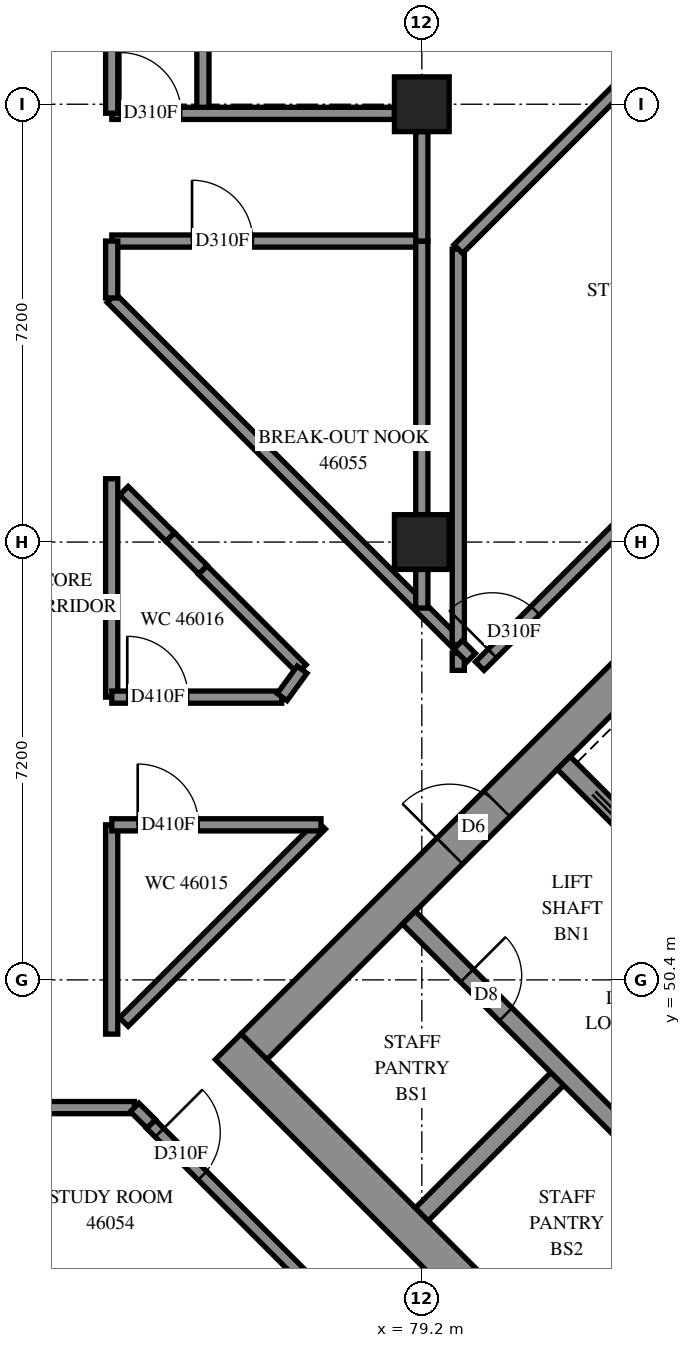
"""IFC4 building model, lengths in metres.
Left out: names, types, materials, properties, quantities, classifications, styles, units other than length and angle.
Written with IfcOpenShell. Run it as: python <this file> out.ifc"""

import sys

from ifc_helpers import new_model, si_unit, direction, frame, frame_2d, origin, origin_2d, place, context, subcontext, project, spatial, rectangle, extrude, element, fill, save


model = new_model("IFC4")
c1 = context("Model", 3, precision=1e-05, world=origin(), true_north=direction((0.0, 1.0)))
c2 = subcontext(c1, "Body", "Model", "MODEL_VIEW")
j1 = project(units=[si_unit("LENGTHUNIT", "METRE"), si_unit("PLANEANGLEUNIT", "RADIAN")], contexts=[c1])
p1 = place(None, origin())
s1 = spatial("IfcSite", under=j1, at=p1, CompositionType="ELEMENT")
p2 = place(p1, origin())
s2 = spatial("IfcBuilding", under=s1, at=p2, CompositionType="ELEMENT")
p3 = place(p2, frame((0.0, 0.0, 169.4)))
s3 = spatial("IfcBuildingStorey", under=s2, at=p3, CompositionType="ELEMENT", Elevation=169.4)
for number, where, z_axis, x_axis in (
    (1, (79.2, 57.6, 0.0), (0.0, 0.0, 1.0), (1.0, 0.0, 0.0)),
    (2, (79.2, 64.8, 0.0), (0.0, 0.0, 1.0), (1.0, 0.0, 0.0)),
):
    element("IfcColumn", number, at=place(p3, frame(where, z_axis=z_axis, x_axis=x_axis)), inside=s3, PredefinedType="COLUMN", context=c2, shape_type="SweptSolid", body=[
        extrude(rectangle(XDim=0.9, YDim=0.9, at=origin_2d()), origin(), (0.0, 0.0, 1.0), 3.1),
    ])
p4 = place(p3, frame((76.018, 49.302, -0.3), z_axis=(0.0, 0.0, 1.0), x_axis=(0.7071067812, -0.7071067812, 0.0)))
e3 = element("IfcWall", 3, at=p4, inside=s3, PredefinedType="SHEAR", context=c2, shape_type="SweptSolid", body=[
    extrude(rectangle(XDim=15.6, YDim=0.6, at=frame_2d((7.8, 0.0))), origin(), (0.0, 0.0, 1.0), 2.7),
])
p5 = place(p3, frame((76.442, 49.302, -0.3), z_axis=(0.0, 0.0, 1.0), x_axis=(0.7071067812, 0.7071067812, 0.0)))
e4 = element("IfcWall", 4, at=p5, inside=s3, PredefinedType="SHEAR", context=c2, shape_type="SweptSolid", body=[
    extrude(rectangle(XDim=14.4, YDim=0.6, at=frame_2d((7.2, 0.0))), origin(), (0.0, 0.0, 1.0), 2.7),
])
p6 = place(p5, frame((4.55, 0.0, 0.3)))
e5 = element("IfcOpeningElement", 5, at=p6, cuts=e4, PredefinedType="OPENING", context=c2, shape_type="SweptSolid", body=[
    extrude(rectangle(XDim=1.1, YDim=2.1, at=frame_2d((0.55, 1.05))), frame((0.0, 0.31, 0.0), z_axis=(0.0, -1.0, 0.0), x_axis=(1.0, 0.0, 0.0)), (0.0, 0.0, 1.0), 0.62),
])
p7 = place(p5, frame((11.35, 0.0, 0.3)))
e6 = element("IfcOpeningElement", 6, at=p7, cuts=e4, PredefinedType="OPENING", context=c2, shape_type="SweptSolid", body=[
    extrude(rectangle(XDim=1.1, YDim=2.1, at=frame_2d((0.55, 1.05))), frame((0.0, 0.31, 0.0), z_axis=(0.0, -1.0, 0.0), x_axis=(1.0, 0.0, 0.0)), (0.0, 0.0, 1.0), 0.62),
])
p8 = place(p3, frame((79.2, 46.544, 0.0), z_axis=(0.0, 0.0, 1.0), x_axis=(0.7071219326, 0.7070916295, 0.0)))
e7 = element("IfcWall", 7, at=p8, inside=s3, PredefinedType="SOLIDWALL", context=c2, shape_type="SweptSolid", body=[
    extrude(rectangle(XDim=3.3, YDim=0.3, at=frame_2d((1.65, 0.0))), origin(), (0.0, 0.0, 1.0), 3.1),
])
p9 = place(p3, frame((81.746, 43.999, 0.0), z_axis=(0.0, 0.0, 1.0), x_axis=(0.7071067812, 0.7071067812, 0.0)))
e8 = element("IfcWall", 8, at=p9, inside=s3, PredefinedType="SOLIDWALL", context=c2, shape_type="SweptSolid", body=[
    extrude(rectangle(XDim=3.3, YDim=0.3, at=frame_2d((1.65, 0.0))), origin(), (0.0, 0.0, 1.0), 3.1),
])
p10 = place(p3, frame((78.988, 51.423, 0.0), z_axis=(0.0, 0.0, 1.0), x_axis=(0.7071067812, -0.7071067812, 0.0)))
e9 = element("IfcWall", 9, at=p10, inside=s3, PredefinedType="SOLIDWALL", context=c2, shape_type="SweptSolid", body=[
    extrude(rectangle(XDim=14.4, YDim=0.3, at=frame_2d((7.2, 0.0))), origin(), (0.0, 0.0, 1.0), 3.1),
])
p11 = place(p10, frame((1.35, 0.0, 0.0)))
e10 = element("IfcOpeningElement", 10, at=p11, cuts=e9, PredefinedType="OPENING", context=c2, shape_type="SweptSolid", body=[
    extrude(rectangle(XDim=0.9, YDim=2.1, at=frame_2d((0.45, 1.05))), frame((0.0, 0.16, 0.0), z_axis=(0.0, -1.0, 0.0), x_axis=(1.0, 0.0, 0.0)), (0.0, 0.0, 1.0), 0.32),
])
p12 = place(p10, frame((4.95, 0.0, 0.0)))
e11 = element("IfcOpeningElement", 11, at=p12, cuts=e9, PredefinedType="OPENING", context=c2, shape_type="SweptSolid", body=[
    extrude(rectangle(XDim=0.9, YDim=2.1, at=frame_2d((0.45, 1.05))), frame((0.0, 0.16, 0.0), z_axis=(0.0, -1.0, 0.0), x_axis=(1.0, 0.0, 0.0)), (0.0, 0.0, 1.0), 0.32),
])
p13 = place(p10, frame((8.55, 0.0, 0.0)))
e12 = element("IfcOpeningElement", 12, at=p13, cuts=e9, PredefinedType="OPENING", context=c2, shape_type="SweptSolid", body=[
    extrude(rectangle(XDim=0.9, YDim=2.1, at=frame_2d((0.45, 1.05))), frame((0.0, 0.16, 0.0), z_axis=(0.0, -1.0, 0.0), x_axis=(1.0, 0.0, 0.0)), (0.0, 0.0, 1.0), 0.32),
])
p14 = place(p10, frame((12.05, 0.0, 0.0)))
e13 = element("IfcOpeningElement", 13, at=p14, cuts=e9, PredefinedType="OPENING", context=c2, shape_type="SweptSolid", body=[
    extrude(rectangle(XDim=1.1, YDim=2.1, at=frame_2d((0.55, 1.05))), frame((0.0, 0.16, 0.0), z_axis=(0.0, -1.0, 0.0), x_axis=(1.0, 0.0, 0.0)), (0.0, 0.0, 1.0), 0.32),
])
p15 = place(p3, frame((81.534, 53.969, 0.0), z_axis=(0.0, 0.0, 1.0), x_axis=(0.707103309, -0.7071102534, 0.0)))
e14 = element("IfcWall", 14, at=p15, inside=s3, PredefinedType="SOLIDWALL", context=c2, shape_type="SweptSolid", body=[
    extrude(rectangle(XDim=14.4, YDim=0.3, at=frame_2d((7.2, 0.0))), origin(), (0.0, 0.0, 1.0), 3.1),
])
p16 = place(p15, frame((1.25, 0.0, 0.0)))
e15 = element("IfcOpeningElement", 15, at=p16, cuts=e14, PredefinedType="OPENING", context=c2, shape_type="SweptSolid", body=[
    extrude(rectangle(XDim=1.1, YDim=2.1, at=frame_2d((0.55, 1.05))), frame((0.0, 0.16, 0.0), z_axis=(0.0, -1.0, 0.0), x_axis=(1.0, 0.0, 0.0)), (0.0, 0.0, 1.0), 0.32),
])
p17 = place(p15, frame((4.85, 0.0, 0.0)))
e16 = element("IfcOpeningElement", 16, at=p17, cuts=e14, PredefinedType="OPENING", context=c2, shape_type="SweptSolid", body=[
    extrude(rectangle(XDim=1.1, YDim=2.1, at=frame_2d((0.55, 1.05))), frame((0.0, 0.16, 0.0), z_axis=(0.0, -1.0, 0.0), x_axis=(1.0, 0.0, 0.0)), (0.0, 0.0, 1.0), 0.32),
])
p18 = place(p15, frame((8.45, 0.0, 0.0)))
e17 = element("IfcOpeningElement", 17, at=p18, cuts=e14, PredefinedType="OPENING", context=c2, shape_type="SweptSolid", body=[
    extrude(rectangle(XDim=1.1, YDim=2.1, at=frame_2d((0.55, 1.05))), frame((0.0, 0.16, 0.0), z_axis=(0.0, -1.0, 0.0), x_axis=(1.0, 0.0, 0.0)), (0.0, 0.0, 1.0), 0.32),
])
p19 = place(p15, frame((12.05, 0.0, 0.0)))
e18 = element("IfcOpeningElement", 18, at=p19, cuts=e14, PredefinedType="OPENING", context=c2, shape_type="SweptSolid", body=[
    extrude(rectangle(XDim=1.1, YDim=2.1, at=frame_2d((0.55, 1.05))), frame((0.0, 0.16, 0.0), z_axis=(0.0, -1.0, 0.0), x_axis=(1.0, 0.0, 0.0)), (0.0, 0.0, 1.0), 0.32),
])
p20 = place(p3, frame((55.5, 48.3, 0.0), z_axis=(0.0, 0.0, 1.0), x_axis=(1.0, 0.0, 0.0)))
e19 = element("IfcWall", 19, at=p20, inside=s3, PredefinedType="PARTITIONING", context=c2, shape_type="SweptSolid", body=[
    extrude(rectangle(XDim=18.974, YDim=0.2, at=frame_2d((9.487, 0.0))), origin(), (0.0, 0.0, 1.0), 3.1),
])
p21 = place(p20, frame((5.963, 0.0, 0.0)))
e20 = element("IfcOpeningElement", 20, at=p21, cuts=e19, PredefinedType="OPENING", context=c2, shape_type="SweptSolid", body=[
    extrude(rectangle(XDim=1.0, YDim=2.1, at=frame_2d((0.5, 1.05))), frame((0.0, 0.11, 0.0), z_axis=(0.0, -1.0, 0.0), x_axis=(1.0, 0.0, 0.0)), (0.0, 0.0, 1.0), 0.22),
])
p22 = place(p20, frame((13.161, 0.0, 0.0)))
e21 = element("IfcOpeningElement", 21, at=p22, cuts=e19, PredefinedType="OPENING", context=c2, shape_type="SweptSolid", body=[
    extrude(rectangle(XDim=0.9, YDim=2.1, at=frame_2d((0.45, 1.05))), frame((0.0, 0.11, 0.0), z_axis=(0.0, -1.0, 0.0), x_axis=(1.0, 0.0, 0.0)), (0.0, 0.0, 1.0), 0.22),
])
p23 = place(p3, frame((80.154, 55.56, 0.0), z_axis=(0.0, 0.0, 1.0), x_axis=(0.7071067812, 0.7071067812, 0.0)))
e22 = element("IfcWall", 22, at=p23, inside=s3, PredefinedType="PARTITIONING", context=c2, shape_type="SweptSolid", body=[
    extrude(rectangle(XDim=9.45, YDim=0.2, at=frame_2d((4.725, 0.0))), origin(), (0.0, 0.0, 1.0), 3.1),
])
p24 = place(p23, frame((0.292, 0.0, 0.0)))
e23 = element("IfcOpeningElement", 23, at=p24, cuts=e22, PredefinedType="OPENING", context=c2, shape_type="SweptSolid", body=[
    extrude(rectangle(XDim=1.0, YDim=2.1, at=frame_2d((0.5, 1.05))), frame((0.0, 0.11, 0.0), z_axis=(0.0, -1.0, 0.0), x_axis=(1.0, 0.0, 0.0)), (0.0, 0.0, 1.0), 0.22),
])
p25 = place(p3, frame((75.6, 64.65, 0.0), z_axis=(0.0, 0.0, 1.0), x_axis=(0.0, 1.0, 0.0)))
e24 = element("IfcWall", 24, at=p25, inside=s3, PredefinedType="PARTITIONING", context=c2, shape_type="SweptSolid", body=[
    extrude(rectangle(XDim=8.168, YDim=0.2, at=frame_2d((4.084, 0.0))), origin(), (0.0, 0.0, 1.0), 3.1),
])
p26 = place(p3, frame((74.097, 61.611, 0.0), z_axis=(0.0, 0.0, 1.0), x_axis=(0.7071067812, -0.7071067812, 0.0)))
e25 = element("IfcWall", 25, at=p26, inside=s3, PredefinedType="PARTITIONING", context=c2, shape_type="SweptSolid", body=[
    extrude(rectangle(XDim=8.061, YDim=0.2, at=frame_2d((4.03, 0.0))), origin(), (0.0, 0.0, 1.0), 3.1),
])
p27 = place(p3, frame((79.8, 55.914, 0.0), z_axis=(0.0, 0.0, 1.0), x_axis=(0.0, 1.0, 0.0)))
e26 = element("IfcWall", 26, at=p27, inside=s3, PredefinedType="PARTITIONING", context=c2, shape_type="SweptSolid", body=[
    extrude(rectangle(XDim=6.504, YDim=0.2, at=frame_2d((3.252, 0.0))), origin(), (0.0, 0.0, 1.0), 3.1),
])
p28 = place(p3, frame((79.799, 62.419, 0.0), z_axis=(0.0, 0.0, 1.0), x_axis=(0.7071067812, 0.7071067812, 0.0)))
e27 = element("IfcWall", 27, at=p28, inside=s3, PredefinedType="PARTITIONING", context=c2, shape_type="SweptSolid", body=[
    extrude(rectangle(XDim=5.716, YDim=0.2, at=frame_2d((2.858, 0.0))), origin(), (0.0, 0.0, 1.0), 3.1),
])
p29 = place(p3, frame((74.102, 62.55, 0.0), z_axis=(0.0, 0.0, 1.0), x_axis=(1.0, 0.0, 0.0)))
e28 = element("IfcWall", 28, at=p29, inside=s3, PredefinedType="PARTITIONING", context=c2, shape_type="SweptSolid", body=[
    extrude(rectangle(XDim=5.098, YDim=0.2, at=frame_2d((2.549, 0.0))), origin(), (0.0, 0.0, 1.0), 3.1),
])
p30 = place(p29, frame((1.319, 0.0, 0.0)))
e29 = element("IfcOpeningElement", 29, at=p30, cuts=e28, PredefinedType="OPENING", context=c2, shape_type="SweptSolid", body=[
    extrude(rectangle(XDim=1.0, YDim=2.1, at=frame_2d((0.5, 1.05))), frame((0.0, 0.11, 0.0), z_axis=(0.0, -1.0, 0.0), x_axis=(1.0, 0.0, 0.0)), (0.0, 0.0, 1.0), 0.22),
])
p31 = place(p3, frame((74.102, 64.65, 0.0), z_axis=(0.0, 0.0, 1.0), x_axis=(1.0, 0.0, 0.0)))
e30 = element("IfcWall", 30, at=p31, inside=s3, PredefinedType="PARTITIONING", context=c2, shape_type="SweptSolid", body=[
    extrude(rectangle(XDim=4.648, YDim=0.2, at=frame_2d((2.324, 0.0))), origin(), (0.0, 0.0, 1.0), 3.1),
])
p32 = place(p31, frame((0.14, 0.0, 0.0)))
e31 = element("IfcOpeningElement", 31, at=p32, cuts=e30, PredefinedType="OPENING", context=c2, shape_type="SweptSolid", body=[
    extrude(rectangle(XDim=1.0, YDim=2.1, at=frame_2d((0.5, 1.05))), frame((0.0, 0.11, 0.0), z_axis=(0.0, -1.0, 0.0), x_axis=(1.0, 0.0, 0.0)), (0.0, 0.0, 1.0), 0.22),
])
p33 = place(p3, frame((74.3, 49.706, 0.0), z_axis=(0.0, 0.0, 1.0), x_axis=(0.7071067812, 0.7071067812, 0.0)))
e32 = element("IfcWall", 32, at=p33, inside=s3, PredefinedType="PARTITIONING", context=c2, shape_type="SweptSolid", body=[
    extrude(rectangle(XDim=4.588, YDim=0.2, at=frame_2d((2.294, 0.0))), origin(), (0.0, 0.0, 1.0), 3.1),
])
p34 = place(p3, frame((79.2, 58.05, 0.0), z_axis=(0.0, 0.0, 1.0), x_axis=(0.0, 1.0, 0.0)))
e33 = element("IfcWall", 33, at=p34, inside=s3, PredefinedType="PARTITIONING", context=c2, shape_type="SweptSolid", body=[
    extrude(rectangle(XDim=4.5, YDim=0.2, at=frame_2d((2.25, 0.0))), origin(), (0.0, 0.0, 1.0), 3.1),
])
p35 = place(p3, frame((74.745, 48.029, 0.0), z_axis=(0.0, 0.0, 1.0), x_axis=(0.7068806156, -0.7073328745, 0.0)))
e34 = element("IfcWall", 34, at=p35, inside=s3, PredefinedType="PARTITIONING", context=c2, shape_type="SweptSolid", body=[
    extrude(rectangle(XDim=4.422, YDim=0.2, at=frame_2d((2.211, 0.0))), origin(), (0.0, 0.0, 1.0), 3.1),
])
p36 = place(p35, frame((0.199, 0.0, 0.0)))
e35 = element("IfcOpeningElement", 35, at=p36, cuts=e34, PredefinedType="OPENING", context=c2, shape_type="SweptSolid", body=[
    extrude(rectangle(XDim=1.0, YDim=2.1, at=frame_2d((0.5, 1.05))), frame((0.0, 0.11, 0.0), z_axis=(0.0, -1.0, 0.0), x_axis=(1.0, 0.0, 0.0)), (0.0, 0.0, 1.0), 0.22),
])
p37 = place(p3, frame((74.1, 55.05, 0.0), z_axis=(0.0, 0.0, 1.0), x_axis=(0.0, 1.0, 0.0)))
e36 = element("IfcWall", 36, at=p37, inside=s3, PredefinedType="PARTITIONING", context=c2, shape_type="SweptSolid", body=[
    extrude(rectangle(XDim=3.592, YDim=0.2, at=frame_2d((1.796, 0.0))), origin(), (0.0, 0.0, 1.0), 3.1),
])
p38 = place(p3, frame((74.1, 49.508, 0.0), z_axis=(0.0, 0.0, 1.0), x_axis=(0.0, 1.0, 0.0)))
e37 = element("IfcWall", 37, at=p38, inside=s3, PredefinedType="PARTITIONING", context=c2, shape_type="SweptSolid", body=[
    extrude(rectangle(XDim=3.442, YDim=0.2, at=frame_2d((1.721, 0.0))), origin(), (0.0, 0.0, 1.0), 3.1),
])
p39 = place(p3, frame((74.102, 52.95, 0.0), z_axis=(0.0, 0.0, 1.0), x_axis=(1.0, 0.0, 0.0)))
e38 = element("IfcWall", 38, at=p39, inside=s3, PredefinedType="PARTITIONING", context=c2, shape_type="SweptSolid", body=[
    extrude(rectangle(XDim=3.44, YDim=0.2, at=frame_2d((1.72, 0.0))), origin(), (0.0, 0.0, 1.0), 3.1),
])
p40 = place(p39, frame((0.426, 0.0, 0.0)))
e39 = element("IfcOpeningElement", 39, at=p40, cuts=e38, PredefinedType="OPENING", context=c2, shape_type="SweptSolid", body=[
    extrude(rectangle(XDim=1.0, YDim=2.1, at=frame_2d((0.5, 1.05))), frame((0.0, 0.11, 0.0), z_axis=(0.0, -1.0, 0.0), x_axis=(1.0, 0.0, 0.0)), (0.0, 0.0, 1.0), 0.22),
])
p41 = place(p3, frame((74.102, 55.05, 0.0), z_axis=(0.0, 0.0, 1.0), x_axis=(1.0, 0.0, 0.0)))
e40 = element("IfcWall", 40, at=p41, inside=s3, PredefinedType="PARTITIONING", context=c2, shape_type="SweptSolid", body=[
    extrude(rectangle(XDim=2.794, YDim=0.2, at=frame_2d((1.397, 0.0))), origin(), (0.0, 0.0, 1.0), 3.1),
])
p42 = place(p41, frame((0.254, 0.0, 0.0)))
e41 = element("IfcOpeningElement", 41, at=p42, cuts=e40, PredefinedType="OPENING", context=c2, shape_type="SweptSolid", body=[
    extrude(rectangle(XDim=1.0, YDim=2.1, at=frame_2d((0.5, 1.05))), frame((0.0, 0.11, 0.0), z_axis=(0.0, -1.0, 0.0), x_axis=(1.0, 0.0, 0.0)), (0.0, 0.0, 1.0), 0.22),
])
p43 = place(p3, frame((75.597, 57.141, 0.0), z_axis=(0.0, 0.0, 1.0), x_axis=(0.7071067812, -0.7071067812, 0.0)))
e42 = element("IfcWall", 42, at=p43, inside=s3, PredefinedType="PARTITIONING", context=c2, shape_type="SweptSolid", body=[
    extrude(rectangle(XDim=2.305, YDim=0.2, at=frame_2d((1.153, 0.0))), origin(), (0.0, 0.0, 1.0), 3.1),
])
p44 = place(p3, frame((74.1, 64.652, 0.0), z_axis=(0.0, 0.0, 1.0), x_axis=(0.0, 1.0, 0.0)))
e43 = element("IfcWall", 43, at=p44, inside=s3, PredefinedType="PARTITIONING", context=c2, shape_type="SweptSolid", body=[
    extrude(rectangle(XDim=2.248, YDim=0.2, at=frame_2d((1.124, 0.0))), origin(), (0.0, 0.0, 1.0), 3.1),
])
p45 = place(p3, frame((79.2, 62.55, 0.0), z_axis=(0.0, 0.0, 1.0), x_axis=(0.0, 1.0, 0.0)))
e44 = element("IfcWall", 44, at=p45, inside=s3, PredefinedType="PARTITIONING", context=c2, shape_type="SweptSolid", body=[
    extrude(rectangle(XDim=1.8, YDim=0.2, at=frame_2d((0.9, 0.0))), origin(), (0.0, 0.0, 1.0), 3.1),
])
p46 = place(p3, frame((74.3, 58.444, 0.0), z_axis=(0.0, 0.0, 1.0), x_axis=(0.7080329185, -0.7061794292, 0.0)))
e45 = element("IfcWall", 45, at=p46, inside=s3, PredefinedType="PARTITIONING", context=c2, shape_type="SweptSolid", body=[
    extrude(rectangle(XDim=1.079, YDim=0.2, at=frame_2d((0.539, 0.0))), origin(), (0.0, 0.0, 1.0), 3.1),
])
p47 = place(p3, frame((74.1, 61.614, 0.0), z_axis=(0.0, 0.0, 1.0), x_axis=(0.0, 1.0, 0.0)))
e46 = element("IfcWall", 46, at=p47, inside=s3, PredefinedType="PARTITIONING", context=c2, shape_type="SweptSolid", body=[
    extrude(rectangle(XDim=0.936, YDim=0.2, at=frame_2d((0.468, 0.0))), origin(), (0.0, 0.0, 1.0), 3.1),
])
p48 = place(p3, frame((75.065, 57.683, 0.0), z_axis=(0.0, 0.0, 1.0), x_axis=(0.705788785, -0.7084223253, 0.0)))
e47 = element("IfcWall", 47, at=p48, inside=s3, PredefinedType="PARTITIONING", context=c2, shape_type="SweptSolid", body=[
    extrude(rectangle(XDim=0.759, YDim=0.2, at=frame_2d((0.38, 0.0))), origin(), (0.0, 0.0, 1.0), 3.1),
])
p49 = place(p3, frame((79.2, 56.514, 0.0), z_axis=(0.0, 0.0, 1.0), x_axis=(0.0, 1.0, 0.0)))
e48 = element("IfcWall", 48, at=p49, inside=s3, PredefinedType="PARTITIONING", context=c2, shape_type="SweptSolid", body=[
    extrude(rectangle(XDim=0.636, YDim=0.2, at=frame_2d((0.318, 0.0))), origin(), (0.0, 0.0, 1.0), 3.1),
])
p50 = place(p3, frame((76.903, 55.051, 0.0), z_axis=(0.0, 0.0, 1.0), x_axis=(0.5890255926, 0.8081143801, 0.0)))
e49 = element("IfcWall", 49, at=p50, inside=s3, PredefinedType="PARTITIONING", context=c2, shape_type="SweptSolid", body=[
    extrude(rectangle(XDim=0.557, YDim=0.2, at=frame_2d((0.278, 0.0))), origin(), (0.0, 0.0, 1.0), 3.1),
])
p51 = place(p3, frame((79.8, 55.49, 0.0), z_axis=(0.0, 0.0, 1.0), x_axis=(0.0, 1.0, 0.0)))
e50 = element("IfcWall", 50, at=p51, inside=s3, PredefinedType="PARTITIONING", context=c2, shape_type="SweptSolid", body=[
    extrude(rectangle(XDim=0.284, YDim=0.2, at=frame_2d((0.142, 0.0))), origin(), (0.0, 0.0, 1.0), 3.1),
])
p52 = place(p3, frame((74.477, 48.303, 0.0), z_axis=(0.0, 0.0, 1.0), x_axis=(0.7097111995, -0.7044927348, 0.0)))
e51 = element("IfcWall", 51, at=p52, inside=s3, PredefinedType="PARTITIONING", context=c2, shape_type="SweptSolid", body=[
    extrude(rectangle(XDim=0.383, YDim=0.2, at=frame_2d((0.192, 0.0))), origin(), (0.0, 0.0, 1.0), 3.1),
])
p53 = place(p3, frame((79.797, 55.911, 0.0), z_axis=(0.0, 0.0, 1.0), x_axis=(0.710418702, -0.7037792749, 0.0)))
e52 = element("IfcWall", 52, at=p53, inside=s3, PredefinedType="PARTITIONING", context=c2, shape_type="SweptSolid", body=[
    extrude(rectangle(XDim=0.301, YDim=0.2, at=frame_2d((0.151, 0.0))), origin(), (0.0, 0.0, 1.0), 3.1),
])
p54 = place(p6, origin())
e53 = element("IfcDoor", 53, at=p54, inside=s3, OperationType="DOUBLE_DOOR_SINGLE_SWING", PredefinedType="DOOR", context=c2, shape_type="SweptSolid", body=[
    extrude(rectangle(XDim=1.1, YDim=2.1, at=frame_2d((0.55, 1.05))), frame((0.0, 0.025, 0.0), z_axis=(0.0, -1.0, 0.0), x_axis=(1.0, 0.0, 0.0)), (0.0, 0.0, 1.0), 0.05),
])
fill(e5, e53)
p55 = place(p11, origin())
e54 = element("IfcDoor", 54, at=p55, inside=s3, OperationType="SINGLE_SWING_LEFT", PredefinedType="DOOR", context=c2, shape_type="SweptSolid", body=[
    extrude(rectangle(XDim=0.9, YDim=2.1, at=frame_2d((0.45, 1.05))), frame((0.0, 0.025, 0.0), z_axis=(0.0, -1.0, 0.0), x_axis=(1.0, 0.0, 0.0)), (0.0, 0.0, 1.0), 0.05),
])
fill(e10, e54)
p56 = place(p40, origin())
e55 = element("IfcDoor", 55, at=p56, inside=s3, OperationType="SINGLE_SWING_RIGHT", PredefinedType="DOOR", context=c2, shape_type="SweptSolid", body=[
    extrude(rectangle(XDim=1.0, YDim=2.1, at=frame_2d((0.5, 1.05))), frame((0.0, 0.025, 0.0), z_axis=(0.0, -1.0, 0.0), x_axis=(1.0, 0.0, 0.0)), (0.0, 0.0, 1.0), 0.05),
])
fill(e39, e55)
p57 = place(p42, origin())
e56 = element("IfcDoor", 56, at=p57, inside=s3, OperationType="SINGLE_SWING_LEFT", PredefinedType="DOOR", context=c2, shape_type="SweptSolid", body=[
    extrude(rectangle(XDim=1.0, YDim=2.1, at=frame_2d((0.5, 1.05))), frame((0.0, 0.025, 0.0), z_axis=(0.0, -1.0, 0.0), x_axis=(1.0, 0.0, 0.0)), (0.0, 0.0, 1.0), 0.05),
])
fill(e41, e56)
p58 = place(p32, origin())
e57 = element("IfcDoor", 57, at=p58, inside=s3, OperationType="SINGLE_SWING_RIGHT", PredefinedType="DOOR", context=c2, shape_type="SweptSolid", body=[
    extrude(rectangle(XDim=1.0, YDim=2.1, at=frame_2d((0.5, 1.05))), frame((0.0, 0.025, 0.0), z_axis=(0.0, -1.0, 0.0), x_axis=(1.0, 0.0, 0.0)), (0.0, 0.0, 1.0), 0.05),
])
fill(e31, e57)
p59 = place(p36, origin())
e58 = element("IfcDoor", 58, at=p59, inside=s3, OperationType="SINGLE_SWING_LEFT", PredefinedType="DOOR", context=c2, shape_type="SweptSolid", body=[
    extrude(rectangle(XDim=1.0, YDim=2.1, at=frame_2d((0.5, 1.05))), frame((0.0, 0.025, 0.0), z_axis=(0.0, -1.0, 0.0), x_axis=(1.0, 0.0, 0.0)), (0.0, 0.0, 1.0), 0.05),
])
fill(e35, e58)
p60 = place(p30, origin())
e59 = element("IfcDoor", 59, at=p60, inside=s3, OperationType="SINGLE_SWING_RIGHT", PredefinedType="DOOR", context=c2, shape_type="SweptSolid", body=[
    extrude(rectangle(XDim=1.0, YDim=2.1, at=frame_2d((0.5, 1.05))), frame((0.0, 0.025, 0.0), z_axis=(0.0, -1.0, 0.0), x_axis=(1.0, 0.0, 0.0)), (0.0, 0.0, 1.0), 0.05),
])
fill(e29, e59)
p61 = place(p24, origin())
e60 = element("IfcDoor", 60, at=p61, inside=s3, OperationType="SINGLE_SWING_LEFT", PredefinedType="DOOR", context=c2, shape_type="SweptSolid", body=[
    extrude(rectangle(XDim=1.0, YDim=2.1, at=frame_2d((0.5, 1.05))), frame((0.0, 0.025, 0.0), z_axis=(0.0, -1.0, 0.0), x_axis=(1.0, 0.0, 0.0)), (0.0, 0.0, 1.0), 0.05),
])
fill(e23, e60)
save(model, sys.argv[1])
